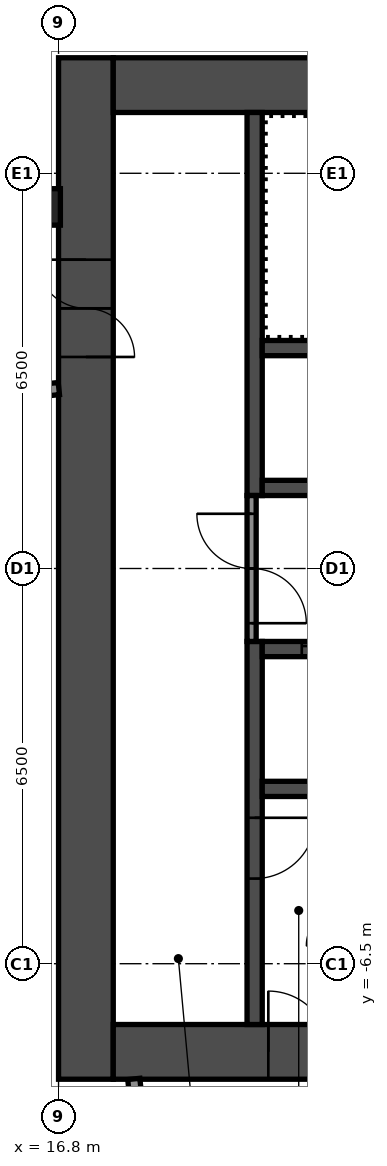
"""IFC4 building model, lengths in metres.
Left out: names, types, materials, properties, quantities, classifications, styles, units other than length and angle.
Written with IfcOpenShell. Run it as: python <this file> out.ifc"""

import sys

from ifc_helpers import new_model, si_unit, direction, frame, frame_2d, origin, origin_2d, place, context, subcontext, project, spatial, rectangle, hollow_rectangle, extrude, element, fill, save


model = new_model("IFC4")
c1 = context("Model", 3, precision=1e-05, world=origin(), true_north=direction((0.0, 1.0)))
c2 = subcontext(c1, "Body", "Model", "MODEL_VIEW")
j1 = project(units=[si_unit("LENGTHUNIT", "METRE"), si_unit("PLANEANGLEUNIT", "RADIAN")], contexts=[c1])
p1 = place(None, origin())
s1 = spatial("IfcSite", under=j1, at=p1, CompositionType="ELEMENT")
p2 = place(p1, origin())
s2 = spatial("IfcBuilding", under=s1, at=p2, CompositionType="ELEMENT")
p3 = place(p2, frame((0.0, 0.0, 242.2)))
s3 = spatial("IfcBuildingStorey", under=s2, at=p3, CompositionType="ELEMENT", Elevation=242.2)
p4 = place(p3, frame((16.53, 5.947, 0.0), z_axis=(0.0, 0.0, 1.0), x_axis=(1.0, 0.0, 0.0)))
e1 = element("IfcColumn", 1, at=p4, inside=s3, PredefinedType="COLUMN", context=c2, shape_type="SweptSolid", body=[
    extrude(hollow_rectangle(XDim=0.6, YDim=0.6, WallThickness=0.025, InnerFilletRadius=0.038, OuterFilletRadius=0.062, at=origin_2d()), origin(), (0.0, 0.0, 1.0), 2.75),
])
p5 = place(p3, frame((17.25, -8.4, 0.0), z_axis=(0.0, 0.0, 1.0), x_axis=(0.0, 1.0, 0.0)))
e2 = element("IfcWall", 2, at=p5, inside=s3, PredefinedType="SHEAR", context=c2, shape_type="SweptSolid", body=[
    extrude(rectangle(XDim=16.8, YDim=0.9, at=frame_2d((8.4, 0.0))), origin(), (0.0, 0.0, 1.0), 2.75),
])
p6 = place(p5, frame((11.879, 0.0, 0.0)))
e3 = element("IfcOpeningElement", 3, at=p6, cuts=e2, PredefinedType="OPENING", context=c2, shape_type="SweptSolid", body=[
    extrude(rectangle(XDim=1.6, YDim=2.1, at=frame_2d((0.8, 1.05))), frame((0.0, 0.46, 0.0), z_axis=(0.0, -1.0, 0.0), x_axis=(1.0, 0.0, 0.0)), (0.0, 0.0, 1.0), 0.92),
])
p7 = place(p3, frame((17.7, 7.95, 0.0), z_axis=(0.0, 0.0, 1.0), x_axis=(1.0, 0.0, 0.0)))
e4 = element("IfcWall", 4, at=p7, inside=s3, PredefinedType="SHEAR", context=c2, shape_type="SweptSolid", body=[
    extrude(rectangle(XDim=15.0, YDim=0.9, at=frame_2d((7.5, 0.0))), origin(), (0.0, 0.0, 1.0), 2.75),
])
p8 = place(p7, frame((10.4, 0.0, 0.0)))
e5 = element("IfcOpeningElement", 5, at=p8, cuts=e4, PredefinedType="OPENING", context=c2, shape_type="SweptSolid", body=[
    extrude(rectangle(XDim=1.2, YDim=2.1, at=frame_2d((0.6, 1.05))), frame((0.0, 0.46, 0.0), z_axis=(0.0, -1.0, 0.0), x_axis=(1.0, 0.0, 0.0)), (0.0, 0.0, 1.0), 0.92),
])
p9 = place(p7, frame((13.35, 0.0, 0.0)))
e6 = element("IfcOpeningElement", 6, at=p9, cuts=e4, PredefinedType="OPENING", context=c2, shape_type="SweptSolid", body=[
    extrude(rectangle(XDim=0.9, YDim=2.1, at=frame_2d((0.45, 1.05))), frame((0.0, 0.46, 0.0), z_axis=(0.0, -1.0, 0.0), x_axis=(1.0, 0.0, 0.0)), (0.0, 0.0, 1.0), 0.92),
])
p10 = place(p3, frame((17.7, -7.95, 0.0), z_axis=(0.0, 0.0, 1.0), x_axis=(1.0, 0.0, 0.0)))
e7 = element("IfcWall", 7, at=p10, inside=s3, PredefinedType="SHEAR", context=c2, shape_type="SweptSolid", body=[
    extrude(rectangle(XDim=15.0, YDim=0.9, at=frame_2d((7.5, 0.0))), origin(), (0.0, 0.0, 1.0), 2.75),
])
p11 = place(p10, frame((2.55, 0.0, 0.0)))
e8 = element("IfcOpeningElement", 8, at=p11, cuts=e7, PredefinedType="OPENING", context=c2, shape_type="SweptSolid", body=[
    extrude(rectangle(XDim=1.0, YDim=2.1, at=frame_2d((0.5, 1.05))), frame((0.0, 0.46, 0.0), z_axis=(0.0, -1.0, 0.0), x_axis=(1.0, 0.0, 0.0)), (0.0, 0.0, 1.0), 0.92),
])
p12 = place(p3, frame((20.025, 1.2, 0.0), z_axis=(0.0, 0.0, 1.0), x_axis=(0.0, 1.0, 0.0)))
e9 = element("IfcWall", 9, at=p12, inside=s3, PredefinedType="SHEAR", context=c2, shape_type="SweptSolid", body=[
    extrude(rectangle(XDim=6.3, YDim=0.25, at=frame_2d((3.15, 0.0))), origin(), (0.0, 0.0, 1.0), 2.75),
])
p13 = place(p3, frame((20.025, -7.5, 0.0), z_axis=(0.0, 0.0, 1.0), x_axis=(0.0, 1.0, 0.0)))
e10 = element("IfcWall", 10, at=p13, inside=s3, PredefinedType="SHEAR", context=c2, shape_type="SweptSolid", body=[
    extrude(rectangle(XDim=6.3, YDim=0.25, at=frame_2d((3.15, 0.0))), origin(), (0.0, 0.0, 1.0), 2.75),
])
p14 = place(p13, frame((2.4, 0.0, 0.0)))
e11 = element("IfcOpeningElement", 11, at=p14, cuts=e10, PredefinedType="OPENING", context=c2, shape_type="SweptSolid", body=[
    extrude(rectangle(XDim=1.0, YDim=2.1, at=frame_2d((0.5, 1.05))), frame((0.0, 0.135, 0.0), z_axis=(0.0, -1.0, 0.0), x_axis=(1.0, 0.0, 0.0)), (0.0, 0.0, 1.0), 0.27),
])
p15 = place(p3, frame((20.15, 1.325, 0.0), z_axis=(0.0, 0.0, 1.0), x_axis=(1.0, 0.0, 0.0)))
e12 = element("IfcWall", 12, at=p15, inside=s3, PredefinedType="SHEAR", context=c2, shape_type="SweptSolid", body=[
    extrude(rectangle(XDim=7.5, YDim=0.25, at=frame_2d((3.75, 0.0))), origin(), (0.0, 0.0, 1.0), 2.75),
])
p16 = place(p15, frame((2.038, 0.0, 0.0)))
e13 = element("IfcOpeningElement", 13, at=p16, cuts=e12, PredefinedType="OPENING", context=c2, shape_type="SweptSolid", body=[
    extrude(rectangle(XDim=0.9, YDim=2.1, at=frame_2d((0.45, 1.05))), frame((0.0, 0.135, 0.0), z_axis=(0.0, -1.0, 0.0), x_axis=(1.0, 0.0, 0.0)), (0.0, 0.0, 1.0), 0.27),
])
p17 = place(p15, frame((5.738, 0.0, 0.0)))
e14 = element("IfcOpeningElement", 14, at=p17, cuts=e12, PredefinedType="OPENING", context=c2, shape_type="SweptSolid", body=[
    extrude(rectangle(XDim=0.9, YDim=2.1, at=frame_2d((0.45, 1.05))), frame((0.0, 0.135, 0.0), z_axis=(0.0, -1.0, 0.0), x_axis=(1.0, 0.0, 0.0)), (0.0, 0.0, 1.0), 0.27),
])
p18 = place(p3, frame((20.15, 3.625, 0.0), z_axis=(0.0, 0.0, 1.0), x_axis=(1.0, 0.0, 0.0)))
e15 = element("IfcWall", 15, at=p18, inside=s3, PredefinedType="SHEAR", context=c2, shape_type="SweptSolid", body=[
    extrude(rectangle(XDim=7.5, YDim=0.25, at=frame_2d((3.75, 0.0))), origin(), (0.0, 0.0, 1.0), 2.75),
])
p19 = place(p3, frame((20.15, -1.325, 0.0), z_axis=(0.0, 0.0, 1.0), x_axis=(1.0, 0.0, 0.0)))
e16 = element("IfcWall", 16, at=p19, inside=s3, PredefinedType="SHEAR", context=c2, shape_type="SweptSolid", body=[
    extrude(rectangle(XDim=7.5, YDim=0.25, at=frame_2d((3.75, 0.0))), origin(), (0.0, 0.0, 1.0), 2.75),
])
p20 = place(p19, frame((0.65, 0.0, 0.0)))
e17 = element("IfcOpeningElement", 17, at=p20, cuts=e16, PredefinedType="OPENING", context=c2, shape_type="SweptSolid", body=[
    extrude(rectangle(XDim=1.1, YDim=2.1, at=frame_2d((0.55, 1.05))), frame((0.0, 0.135, 0.0), z_axis=(0.0, -1.0, 0.0), x_axis=(1.0, 0.0, 0.0)), (0.0, 0.0, 1.0), 0.27),
])
p21 = place(p19, frame((3.05, 0.0, 0.0)))
e18 = element("IfcOpeningElement", 18, at=p21, cuts=e16, PredefinedType="OPENING", context=c2, shape_type="SweptSolid", body=[
    extrude(rectangle(XDim=1.1, YDim=2.1, at=frame_2d((0.55, 1.05))), frame((0.0, 0.135, 0.0), z_axis=(0.0, -1.0, 0.0), x_axis=(1.0, 0.0, 0.0)), (0.0, 0.0, 1.0), 0.27),
])
p22 = place(p19, frame((5.45, 0.0, 0.0)))
e19 = element("IfcOpeningElement", 19, at=p22, cuts=e16, PredefinedType="OPENING", context=c2, shape_type="SweptSolid", body=[
    extrude(rectangle(XDim=1.1, YDim=2.1, at=frame_2d((0.55, 1.05))), frame((0.0, 0.135, 0.0), z_axis=(0.0, -1.0, 0.0), x_axis=(1.0, 0.0, 0.0)), (0.0, 0.0, 1.0), 0.27),
])
p23 = place(p3, frame((20.15, -3.625, 0.0), z_axis=(0.0, 0.0, 1.0), x_axis=(1.0, 0.0, 0.0)))
e20 = element("IfcWall", 20, at=p23, inside=s3, PredefinedType="SHEAR", context=c2, shape_type="SweptSolid", body=[
    extrude(rectangle(XDim=7.5, YDim=0.25, at=frame_2d((3.75, 0.0))), origin(), (0.0, 0.0, 1.0), 2.75),
])
p24 = place(p3, frame((19.975, -1.2, 0.0), z_axis=(0.0, 0.0, 1.0), x_axis=(0.0, 1.0, 0.0)))
e21 = element("IfcWall", 21, at=p24, inside=s3, PredefinedType="PARTITIONING", context=c2, shape_type="SweptSolid", body=[
    extrude(rectangle(XDim=2.4, YDim=0.15, at=frame_2d((1.2, 0.0))), origin(), (0.0, 0.0, 1.0), 2.75),
])
p25 = place(p24, frame((0.3, 0.0, 0.0)))
e22 = element("IfcOpeningElement", 22, at=p25, cuts=e21, PredefinedType="OPENING", context=c2, shape_type="SweptSolid", body=[
    extrude(rectangle(XDim=1.8, YDim=2.1, at=frame_2d((0.9, 1.05))), frame((0.0, 0.085, 0.0), z_axis=(0.0, -1.0, 0.0), x_axis=(1.0, 0.0, 0.0)), (0.0, 0.0, 1.0), 0.17),
])
p26 = place(p3, frame((-16.572, -0.549, 0.0), z_axis=(0.0, 0.0, 1.0), x_axis=(0.994521146831, 0.104535584879, 0.0)))
e23 = element("IfcWall", 23, at=p26, inside=s3, PredefinedType="PARTITIONING", context=c2, shape_type="SweptSolid", body=[
    extrude(rectangle(XDim=33.561, YDim=0.2, at=frame_2d((16.78, 0.0))), origin(), (0.0, 0.0, 1.0), 2.75),
])
p27 = place(p26, frame((1.9, 0.0, 0.0)))
e24 = element("IfcOpeningElement", 24, at=p27, cuts=e23, PredefinedType="OPENING", context=c2, shape_type="SweptSolid", body=[
    extrude(rectangle(XDim=0.9, YDim=2.1, at=frame_2d((0.45, 1.05))), frame((0.0, 0.11, 0.0), z_axis=(0.0, -1.0, 0.0), x_axis=(1.0, 0.0, 0.0)), (0.0, 0.0, 1.0), 0.22),
])
p28 = place(p26, frame((6.1, 0.0, 0.0)))
e25 = element("IfcOpeningElement", 25, at=p28, cuts=e23, PredefinedType="OPENING", context=c2, shape_type="SweptSolid", body=[
    extrude(rectangle(XDim=0.9, YDim=2.1, at=frame_2d((0.45, 1.05))), frame((0.0, 0.11, 0.0), z_axis=(0.0, -1.0, 0.0), x_axis=(1.0, 0.0, 0.0)), (0.0, 0.0, 1.0), 0.22),
])
p29 = place(p26, frame((11.25, 0.0, 0.0)))
e26 = element("IfcOpeningElement", 26, at=p29, cuts=e23, PredefinedType="OPENING", context=c2, shape_type="SweptSolid", body=[
    extrude(rectangle(XDim=1.0, YDim=2.1, at=frame_2d((0.5, 1.05))), frame((0.0, 0.11, 0.0), z_axis=(0.0, -1.0, 0.0), x_axis=(1.0, 0.0, 0.0)), (0.0, 0.0, 1.0), 0.22),
])
p30 = place(p26, frame((12.95, 0.0, 0.0)))
e27 = element("IfcOpeningElement", 27, at=p30, cuts=e23, PredefinedType="OPENING", context=c2, shape_type="SweptSolid", body=[
    extrude(rectangle(XDim=1.0, YDim=2.1, at=frame_2d((0.5, 1.05))), frame((0.0, 0.11, 0.0), z_axis=(0.0, -1.0, 0.0), x_axis=(1.0, 0.0, 0.0)), (0.0, 0.0, 1.0), 0.22),
])
p31 = place(p26, frame((20.5, 0.0, 0.0)))
e28 = element("IfcOpeningElement", 28, at=p31, cuts=e23, PredefinedType="OPENING", context=c2, shape_type="SweptSolid", body=[
    extrude(rectangle(XDim=1.0, YDim=2.1, at=frame_2d((0.5, 1.05))), frame((0.0, 0.11, 0.0), z_axis=(0.0, -1.0, 0.0), x_axis=(1.0, 0.0, 0.0)), (0.0, 0.0, 1.0), 0.22),
])
p32 = place(p26, frame((29.4, 0.0, 0.0)))
e29 = element("IfcOpeningElement", 29, at=p32, cuts=e23, PredefinedType="OPENING", context=c2, shape_type="SweptSolid", body=[
    extrude(rectangle(XDim=1.6, YDim=2.1, at=frame_2d((0.8, 1.05))), frame((0.0, 0.11, 0.0), z_axis=(0.0, -1.0, 0.0), x_axis=(1.0, 0.0, 0.0)), (0.0, 0.0, 1.0), 0.22),
])
p33 = place(p3, frame((18.516, -12.949, 0.0), z_axis=(0.0, 0.0, 1.0), x_axis=(-0.104548796268, 0.994519758074, 0.0)))
e30 = element("IfcWall", 30, at=p33, inside=s3, PredefinedType="PARTITIONING", context=c2, shape_type="SweptSolid", body=[
    extrude(rectangle(XDim=4.579, YDim=0.2, at=frame_2d((2.29, 0.0))), origin(), (0.0, 0.0, 1.0), 2.75),
])
p34 = place(p6, origin())
e31 = element("IfcDoor", 31, at=p34, inside=s3, OperationType="DOUBLE_DOOR_SINGLE_SWING", PredefinedType="DOOR", context=c2, shape_type="SweptSolid", body=[
    extrude(rectangle(XDim=1.6, YDim=2.1, at=frame_2d((0.8, 1.05))), frame((0.0, 0.025, 0.0), z_axis=(0.0, -1.0, 0.0), x_axis=(1.0, 0.0, 0.0)), (0.0, 0.0, 1.0), 0.05),
])
fill(e3, e31)
p35 = place(p11, origin())
e32 = element("IfcDoor", 32, at=p35, inside=s3, OperationType="SINGLE_SWING_RIGHT", PredefinedType="DOOR", context=c2, shape_type="SweptSolid", body=[
    extrude(rectangle(XDim=1.0, YDim=2.1, at=frame_2d((0.5, 1.05))), frame((0.0, 0.025, 0.0), z_axis=(0.0, -1.0, 0.0), x_axis=(1.0, 0.0, 0.0)), (0.0, 0.0, 1.0), 0.05),
])
fill(e8, e32)
p36 = place(p14, origin())
e33 = element("IfcDoor", 33, at=p36, inside=s3, OperationType="SINGLE_SWING_RIGHT", PredefinedType="DOOR", context=c2, shape_type="SweptSolid", body=[
    extrude(rectangle(XDim=1.0, YDim=2.1, at=frame_2d((0.5, 1.05))), frame((0.0, 0.025, 0.0), z_axis=(0.0, -1.0, 0.0), x_axis=(1.0, 0.0, 0.0)), (0.0, 0.0, 1.0), 0.05),
])
fill(e11, e33)
p37 = place(p25, origin())
e34 = element("IfcDoor", 34, at=p37, inside=s3, OperationType="DOUBLE_DOOR_SINGLE_SWING", PredefinedType="DOOR", context=c2, shape_type="SweptSolid", body=[
    extrude(rectangle(XDim=1.8, YDim=2.1, at=frame_2d((0.9, 1.05))), frame((0.0, 0.025, 0.0), z_axis=(0.0, -1.0, 0.0), x_axis=(1.0, 0.0, 0.0)), (0.0, 0.0, 1.0), 0.05),
])
fill(e22, e34)
p38 = place(p20, origin())
e35 = element("IfcDoor", 35, at=p38, inside=s3, OperationType="DOUBLE_DOOR_SLIDING", PredefinedType="DOOR", context=c2, shape_type="SweptSolid", body=[
    extrude(rectangle(XDim=1.1, YDim=2.1, at=frame_2d((0.55, 1.05))), frame((0.0, 0.025, 0.0), z_axis=(0.0, -1.0, 0.0), x_axis=(1.0, 0.0, 0.0)), (0.0, 0.0, 1.0), 0.05),
])
fill(e17, e35)
save(model, sys.argv[1])
